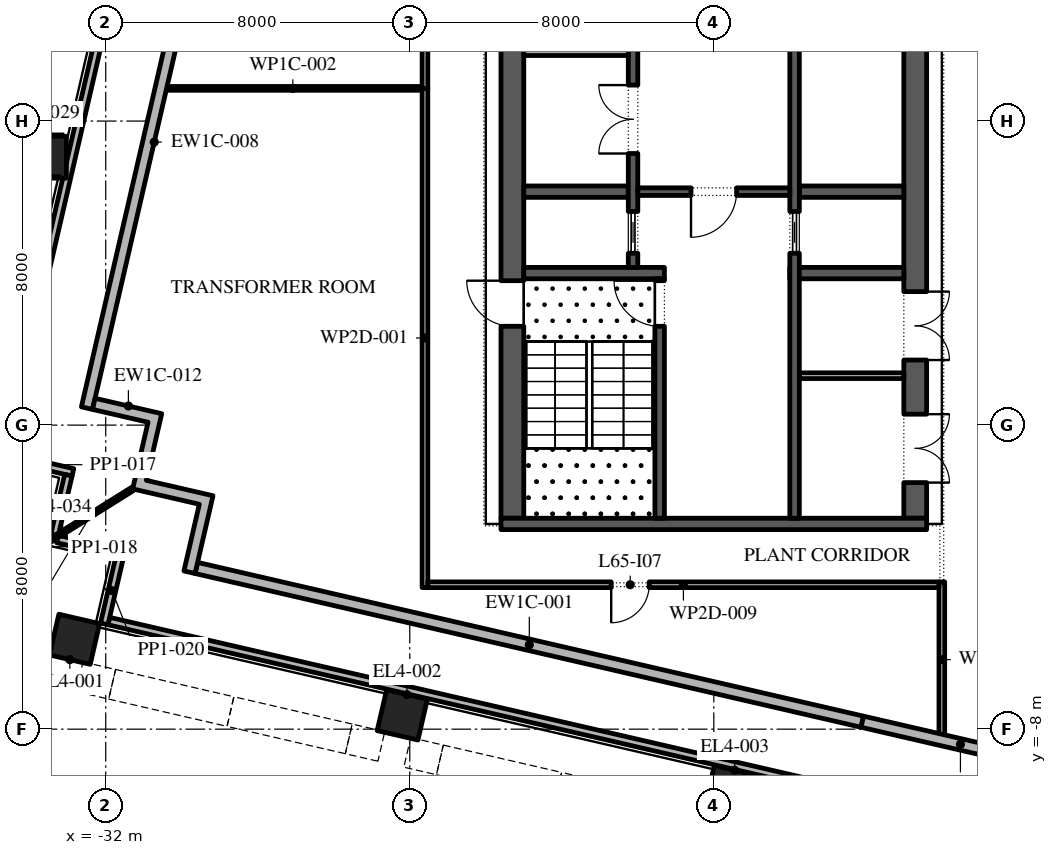
"""IFC4 building model, lengths in metres.
Left out: names, types, materials, properties, quantities, classifications, styles, units other than length and angle.
Written with IfcOpenShell. Run it as: python <this file> out.ifc"""

import sys

from ifc_helpers import new_model, si_unit, direction, frame, frame_2d, origin, origin_2d, place, context, subcontext, project, spatial, polyline, rectangle, outline, extrude, element, fill, save


model = new_model("IFC4")
c1 = context("Model", 3, precision=1e-05, world=origin(), true_north=direction((0.0, 1.0)))
c2 = subcontext(c1, "Body", "Model", "MODEL_VIEW")
j1 = project(units=[si_unit("LENGTHUNIT", "METRE"), si_unit("PLANEANGLEUNIT", "RADIAN")], contexts=[c1])
p1 = place(None, origin())
s1 = spatial("IfcSite", under=j1, at=p1, CompositionType="ELEMENT")
p2 = place(p1, origin())
s2 = spatial("IfcBuilding", under=s1, at=p2, CompositionType="ELEMENT")
p3 = place(p2, frame((0.0, 0.0, 297.6)))
s3 = spatial("IfcBuildingStorey", under=s2, at=p3, CompositionType="ELEMENT", Elevation=297.6)
for number, where, z_axis, x_axis in (
    (1, (-32.821, -5.635, 0.0), (0.0, 0.0, 1.0), (0.974, -0.225, 0.0)),
    (2, (-24.197, -7.626, 0.0), (0.0, 0.0, 1.0), (0.974, -0.225, 0.0)),
    (3, (-15.574, -9.617, 0.0), (0.0, 0.0, 1.0), (0.974, -0.225, 0.0)),
):
    element("IfcColumn", number, at=place(p3, frame(where, z_axis=z_axis, x_axis=x_axis)), inside=s3, PredefinedType="COLUMN", context=c2, shape_type="SweptSolid", body=[
        extrude(rectangle(XDim=1.1, YDim=1.1, at=origin_2d()), origin(), (0.0, 0.0, 1.0), 5.4),
    ])
p4 = place(p3, frame((-33.587, 7.049, 0.0), z_axis=(0.002938534749, 0.012658303533, 0.999915562618), x_axis=(-0.974097200243, 0.226129707199, 0.0)))
e4 = element("IfcColumn", 4, at=p4, inside=s3, PredefinedType="COLUMN", context=c2, shape_type="SweptSolid", body=[
    extrude(rectangle(XDim=1.1, YDim=1.1, at=origin_2d()), origin(), (0.0, 0.0, 1.0), 5.4),
])
p5 = place(p3, frame((-29.616, -3.758, 0.0), z_axis=(0.0, 0.0, 1.0), x_axis=(0.974371744197, -0.224943779886, 0.0)))
e5 = element("IfcWall", 5, at=p5, inside=s3, PredefinedType="STANDARD", context=c2, shape_type="SweptSolid", body=[
    extrude(rectangle(XDim=17.984, YDim=0.3, at=frame_2d((8.992, 0.0))), origin(), (0.0, 0.0, 1.0), 4.95),
])
p6 = place(p3, origin())
e6 = element("IfcWall", 6, at=p6, inside=s3, PredefinedType="STANDARD", context=c2, shape_type="SweptSolid", body=[
    extrude(outline(polyline([(-31.291, -1.678), (-30.886, 0.076), (-32.348, 0.413), (-32.28, 0.705), (-30.526, 0.301), (-30.931, -1.453), (-29.177, -1.858), (-29.65, -3.905), (-29.942, -3.837), (-29.537, -2.083), (-31.291, -1.678)])), origin(), (0.0, 0.0, 1.0), 4.95),
])
p7 = place(p3, frame((-31.919, -5.156, -0.05), z_axis=(0.0, 0.0, 1.0), x_axis=(0.974370681559, -0.224948382787, 0.0)))
e7 = element("IfcWall", 7, at=p7, inside=s3, PredefinedType="STANDARD", context=c2, shape_type="SweptSolid", body=[
    extrude(rectangle(XDim=51.76, YDim=0.2, at=frame_2d((25.88, 0.0))), origin(), (0.0, 0.0, 1.0), 1.1),
])
p8 = place(p3, frame((-21.517, 56.35, -0.05), z_axis=(0.0, 0.0, 1.0), x_axis=(-0.224951435492, -0.97436997679, 0.0)))
e8 = element("IfcWall", 8, at=p8, inside=s3, PredefinedType="STANDARD", context=c2, shape_type="SweptSolid", body=[
    extrude(rectangle(XDim=58.769, YDim=0.2, at=frame_2d((29.385, 0.0))), origin(), (0.0, 0.0, 1.0), 1.1),
])
p9 = place(p3, frame((-34.617, -0.838, -0.05), z_axis=(0.0, 0.0, 1.0), x_axis=(0.974356896201, -0.225008086135, 0.0)))
e9 = element("IfcWall", 9, at=p9, inside=s3, PredefinedType="STANDARD", context=c2, shape_type="SweptSolid", body=[
    extrude(rectangle(XDim=1.8, YDim=0.2, at=frame_2d((0.9, 0.0))), origin(), (0.0, 0.0, 1.0), 1.1),
])
p10 = place(p3, frame((-32.983, -1.318, -0.05), z_axis=(0.0, 0.0, 1.0), x_axis=(-0.22502584423, -0.974352795156, 0.0)))
e10 = element("IfcWall", 10, at=p10, inside=s3, PredefinedType="STANDARD", context=c2, shape_type="SweptSolid", body=[
    extrude(rectangle(XDim=1.608, YDim=0.2, at=frame_2d((0.804, 0.0))), origin(), (0.0, 0.0, 1.0), 1.1),
])
for number, where, z_axis, x_axis in (
    (11, (-33.269, -2.997, -0.05), (0.0, 0.0, 1.0), (0.974, -0.225, 0.0)),
    (12, (-31.635, -3.477, -0.05), (0.0, 0.0, 1.0), (-0.225, -0.974, 0.0)),
):
    element("IfcWall", number, at=place(p3, frame(where, z_axis=z_axis, x_axis=x_axis)), inside=s3, PredefinedType="STANDARD", context=c2, shape_type="SweptSolid", body=[
        extrude(rectangle(XDim=1.8, YDim=0.2, at=frame_2d((0.9, 0.0))), origin(), (0.0, 0.0, 1.0), 1.1),
    ])
p11 = place(p3, frame((-31.291, -1.678, -0.05), z_axis=(0.0, 0.0, 1.0), x_axis=(-0.84807753525, -0.529872148923, 0.0)))
e13 = element("IfcWall", 13, at=p11, inside=s3, PredefinedType="STANDARD", context=c2, shape_type="SweptSolid", body=[
    extrude(rectangle(XDim=2.596, YDim=0.1, at=frame_2d((1.298, 0.0))), origin(), (0.0, 0.0, 1.0), 5.0),
])
p12 = place(p3, frame((-21.3, -2.45, 0.0), z_axis=(0.0, 0.0, 1.0), x_axis=(0.0, 1.0, 0.0)))
e14 = element("IfcWall", 14, at=p12, inside=s3, PredefinedType="SHEAR", context=c2, shape_type="SweptSolid", body=[
    extrude(rectangle(XDim=27.9, YDim=0.6, at=frame_2d((13.95, 0.0))), origin(), (0.0, 0.0, 1.0), 4.95),
])
p13 = place(p12, frame((5.05, 0.0, 0.0)))
e15 = element("IfcOpeningElement", 15, at=p13, cuts=e14, PredefinedType="OPENING", context=c2, shape_type="SweptSolid", body=[
    extrude(rectangle(XDim=1.2, YDim=2.1, at=frame_2d((0.6, 1.05))), frame((0.0, 0.31, 0.0), z_axis=(0.0, -1.0, 0.0), x_axis=(1.0, 0.0, 0.0)), (0.0, 0.0, 1.0), 0.62),
])
p14 = place(p12, frame((21.65, 0.0, 0.0)))
e16 = element("IfcOpeningElement", 16, at=p14, cuts=e14, PredefinedType="OPENING", context=c2, shape_type="SweptSolid", body=[
    extrude(rectangle(XDim=1.2, YDim=2.1, at=frame_2d((0.6, 1.05))), frame((0.0, 0.31, 0.0), z_axis=(0.0, -1.0, 0.0), x_axis=(1.0, 0.0, 0.0)), (0.0, 0.0, 1.0), 0.62),
])
p15 = place(p3, frame((-10.7, -2.45, 0.0), z_axis=(0.0, 0.0, 1.0), x_axis=(0.0, 1.0, 0.0)))
e17 = element("IfcWall", 17, at=p15, inside=s3, PredefinedType="SHEAR", context=c2, shape_type="SweptSolid", body=[
    extrude(rectangle(XDim=27.9, YDim=0.6, at=frame_2d((13.95, 0.0))), origin(), (0.0, 0.0, 1.0), 4.95),
])
p16 = place(p15, frame((23.65, 0.0, 0.0)))
e18 = element("IfcOpeningElement", 18, at=p16, cuts=e17, PredefinedType="OPENING", context=c2, shape_type="SweptSolid", body=[
    extrude(rectangle(XDim=2.4, YDim=2.1, at=frame_2d((1.2, 1.05))), frame((0.0, 0.31, 0.0), z_axis=(0.0, -1.0, 0.0), x_axis=(1.0, 0.0, 0.0)), (0.0, 0.0, 1.0), 0.62),
])
p17 = place(p15, frame((0.938, 0.0, 0.0)))
e19 = element("IfcOpeningElement", 19, at=p17, cuts=e17, PredefinedType="OPENING", context=c2, shape_type="SweptSolid", body=[
    extrude(rectangle(XDim=1.8, YDim=2.4, at=frame_2d((0.9, 1.2))), frame((0.0, 0.31, 0.0), z_axis=(0.0, -1.0, 0.0), x_axis=(1.0, 0.0, 0.0)), (0.0, 0.0, 1.0), 0.62),
])
p18 = place(p15, frame((4.163, 0.0, 0.0)))
e20 = element("IfcOpeningElement", 20, at=p18, cuts=e17, PredefinedType="OPENING", context=c2, shape_type="SweptSolid", body=[
    extrude(rectangle(XDim=1.8, YDim=2.4, at=frame_2d((0.9, 1.2))), frame((0.0, 0.31, 0.0), z_axis=(0.0, -1.0, 0.0), x_axis=(1.0, 0.0, 0.0)), (0.0, 0.0, 1.0), 0.62),
])
p19 = place(p3, frame((-21.6, -2.6, 0.0), z_axis=(0.0, 0.0, 1.0), x_axis=(1.0, 0.0, 0.0)))
e21 = element("IfcWall", 21, at=p19, inside=s3, PredefinedType="SHEAR", context=c2, shape_type="SweptSolid", body=[
    extrude(rectangle(XDim=11.2, YDim=0.3, at=frame_2d((5.6, 0.0))), origin(), (0.0, 0.0, 1.0), 4.95),
])
p20 = place(p3, frame((-21.0, 4.0, 0.0), z_axis=(0.0, 0.0, 1.0), x_axis=(1.0, 0.0, 0.0)))
e22 = element("IfcWall", 22, at=p20, inside=s3, PredefinedType="SHEAR", context=c2, shape_type="SweptSolid", body=[
    extrude(rectangle(XDim=3.7, YDim=0.3, at=frame_2d((1.85, 0.0))), origin(), (0.0, 0.0, 1.0), 4.95),
])
p21 = place(p3, frame((-17.425, -2.45, 0.0), z_axis=(0.0, 0.0, 1.0), x_axis=(0.0, 1.0, 0.0)))
e23 = element("IfcWall", 23, at=p21, inside=s3, PredefinedType="SHEAR", context=c2, shape_type="SweptSolid", body=[
    extrude(rectangle(XDim=6.3, YDim=0.25, at=frame_2d((3.15, 0.0))), origin(), (0.0, 0.0, 1.0), 4.95),
])
p22 = place(p21, frame((5.05, 0.0, 0.0)))
e24 = element("IfcOpeningElement", 24, at=p22, cuts=e23, PredefinedType="OPENING", context=c2, shape_type="SweptSolid", body=[
    extrude(rectangle(XDim=1.2, YDim=2.1, at=frame_2d((0.6, 1.05))), frame((0.0, 0.135, 0.0), z_axis=(0.0, -1.0, 0.0), x_axis=(1.0, 0.0, 0.0)), (0.0, 0.0, 1.0), 0.27),
])
p23 = place(p3, frame((-21.0, 6.143, 0.0), z_axis=(0.0, 0.0, 1.0), x_axis=(1.0, 0.0, 0.0)))
e25 = element("IfcWall", 25, at=p23, inside=s3, PredefinedType="SHEAR", context=c2, shape_type="SweptSolid", body=[
    extrude(rectangle(XDim=2.75, YDim=0.3, at=frame_2d((1.375, 0.0))), origin(), (0.0, 0.0, 1.0), 4.95),
])
p24 = place(p3, frame((-18.125, 4.15, 0.0), z_axis=(0.0, 0.0, 1.0), x_axis=(0.0, 1.0, 0.0)))
e26 = element("IfcWall", 26, at=p24, inside=s3, PredefinedType="SHEAR", context=c2, shape_type="SweptSolid", body=[
    extrude(rectangle(XDim=14.7, YDim=0.25, at=frame_2d((7.35, 0.0))), origin(), (0.0, 0.0, 1.0), 4.95),
])
p25 = place(p24, frame((2.996, 0.0, 0.0)))
e27 = element("IfcOpeningElement", 27, at=p25, cuts=e26, PredefinedType="OPENING", context=c2, shape_type="SweptSolid", body=[
    extrude(rectangle(XDim=1.8, YDim=2.4, at=frame_2d((0.9, 1.2))), frame((0.0, 0.135, 0.0), z_axis=(0.0, -1.0, 0.0), x_axis=(1.0, 0.0, 0.0)), (0.0, 0.0, 1.0), 0.27),
])
p26 = place(p24, frame((6.45, 0.0, 0.0)))
e28 = element("IfcOpeningElement", 28, at=p26, cuts=e26, PredefinedType="OPENING", context=c2, shape_type="SweptSolid", body=[
    extrude(rectangle(XDim=1.8, YDim=2.4, at=frame_2d((0.9, 1.2))), frame((0.0, 0.135, 0.0), z_axis=(0.0, -1.0, 0.0), x_axis=(1.0, 0.0, 0.0)), (0.0, 0.0, 1.0), 0.27),
])
p27 = place(p24, frame((9.904, 0.0, 0.0)))
e29 = element("IfcOpeningElement", 29, at=p27, cuts=e26, PredefinedType="OPENING", context=c2, shape_type="SweptSolid", body=[
    extrude(rectangle(XDim=1.8, YDim=2.4, at=frame_2d((0.9, 1.2))), frame((0.0, 0.135, 0.0), z_axis=(0.0, -1.0, 0.0), x_axis=(1.0, 0.0, 0.0)), (0.0, 0.0, 1.0), 0.27),
])
p28 = place(p24, frame((0.371, 0.0, 0.0)))
e30 = element("IfcOpeningElement", 30, at=p28, cuts=e26, PredefinedType="OPENING", context=c2, shape_type="SweptSolid", body=[
    extrude(rectangle(XDim=1.1, YDim=2.1, at=frame_2d((0.55, 1.05))), frame((0.0, 0.135, 0.0), z_axis=(0.0, -1.0, 0.0), x_axis=(1.0, 0.0, 0.0)), (0.0, 0.0, 1.0), 0.27),
])
p29 = place(p24, frame((13.229, 0.0, 0.0)))
e31 = element("IfcOpeningElement", 31, at=p29, cuts=e26, PredefinedType="OPENING", context=c2, shape_type="SweptSolid", body=[
    extrude(rectangle(XDim=1.1, YDim=2.1, at=frame_2d((0.55, 1.05))), frame((0.0, 0.135, 0.0), z_axis=(0.0, -1.0, 0.0), x_axis=(1.0, 0.0, 0.0)), (0.0, 0.0, 1.0), 0.27),
])
p30 = place(p3, frame((-21.0, 9.8, 0.0), z_axis=(0.0, 0.0, 1.0), x_axis=(1.0, 0.0, 0.0)))
e32 = element("IfcWall", 32, at=p30, inside=s3, PredefinedType="PARTITIONING", context=c2, shape_type="SweptSolid", body=[
    extrude(rectangle(XDim=2.75, YDim=0.15, at=frame_2d((1.375, 0.0))), origin(), (0.0, 0.0, 1.0), 4.95),
])
p31 = place(p3, frame((-14.0, 4.0, 0.0), z_axis=(0.0, 0.0, 1.0), x_axis=(1.0, 0.0, 0.0)))
e33 = element("IfcWall", 33, at=p31, inside=s3, PredefinedType="SHEAR", context=c2, shape_type="SweptSolid", body=[
    extrude(rectangle(XDim=3.0, YDim=0.3, at=frame_2d((1.5, 0.0))), origin(), (0.0, 0.0, 1.0), 4.95),
])
p32 = place(p3, frame((-13.75, 6.143, 0.0), z_axis=(0.0, 0.0, 1.0), x_axis=(1.0, 0.0, 0.0)))
e34 = element("IfcWall", 34, at=p32, inside=s3, PredefinedType="SHEAR", context=c2, shape_type="SweptSolid", body=[
    extrude(rectangle(XDim=2.75, YDim=0.3, at=frame_2d((1.375, 0.0))), origin(), (0.0, 0.0, 1.0), 4.95),
])
p33 = place(p3, frame((-13.875, -2.45, 0.0), z_axis=(0.0, 0.0, 1.0), x_axis=(0.0, 1.0, 0.0)))
e35 = element("IfcWall", 35, at=p33, inside=s3, PredefinedType="SHEAR", context=c2, shape_type="SweptSolid", body=[
    extrude(rectangle(XDim=21.3, YDim=0.25, at=frame_2d((10.65, 0.0))), origin(), (0.0, 0.0, 1.0), 4.95),
])
p34 = place(p33, frame((17.336, 0.0, 0.0)))
e36 = element("IfcOpeningElement", 36, at=p34, cuts=e35, PredefinedType="OPENING", context=c2, shape_type="SweptSolid", body=[
    extrude(rectangle(XDim=1.8, YDim=2.4, at=frame_2d((0.9, 1.2))), frame((0.0, 0.135, 0.0), z_axis=(0.0, -1.0, 0.0), x_axis=(1.0, 0.0, 0.0)), (0.0, 0.0, 1.0), 0.27),
])
p35 = place(p33, frame((6.971, 0.0, 0.0)))
e37 = element("IfcOpeningElement", 37, at=p35, cuts=e35, PredefinedType="OPENING", context=c2, shape_type="SweptSolid", body=[
    extrude(rectangle(XDim=1.1, YDim=2.1, at=frame_2d((0.55, 1.05))), frame((0.0, 0.135, 0.0), z_axis=(0.0, -1.0, 0.0), x_axis=(1.0, 0.0, 0.0)), (0.0, 0.0, 1.0), 0.27),
])
p36 = place(p3, frame((-18.0, 6.143, 0.0), z_axis=(0.0, 0.0, 1.0), x_axis=(1.0, 0.0, 0.0)))
e38 = element("IfcWall", 38, at=p36, inside=s3, PredefinedType="SHEAR", context=c2, shape_type="SweptSolid", body=[
    extrude(rectangle(XDim=4.0, YDim=0.2, at=frame_2d((2.0, 0.0))), origin(), (0.0, 0.0, 1.0), 4.95),
])
p37 = place(p36, frame((1.4, 0.0, 0.0)))
e39 = element("IfcOpeningElement", 39, at=p37, cuts=e38, PredefinedType="OPENING", context=c2, shape_type="SweptSolid", body=[
    extrude(rectangle(XDim=1.2, YDim=2.1, at=frame_2d((0.6, 1.05))), frame((0.0, 0.11, 0.0), z_axis=(0.0, -1.0, 0.0), x_axis=(1.0, 0.0, 0.0)), (0.0, 0.0, 1.0), 0.22),
])
p38 = place(p3, frame((-13.75, 1.3, 0.0), z_axis=(0.0, 0.0, 1.0), x_axis=(1.0, 0.0, 0.0)))
e40 = element("IfcWall", 40, at=p38, inside=s3, PredefinedType="PARTITIONING", context=c2, shape_type="SweptSolid", body=[
    extrude(rectangle(XDim=2.75, YDim=0.15, at=frame_2d((1.375, 0.0))), origin(), (0.0, 0.0, 1.0), 4.95),
])
p39 = place(p3, frame((-23.6, -4.275, 0.0), z_axis=(0.0, 0.0, 1.0), x_axis=(0.0, 1.0, 0.0)))
e41 = element("IfcWall", 41, at=p39, inside=s3, PredefinedType="PARTITIONING", context=c2, shape_type="SweptSolid", body=[
    extrude(rectangle(XDim=13.135, YDim=0.15, at=frame_2d((6.567, 0.0))), origin(), (0.0, 0.0, 1.0), 4.95),
])
p40 = place(p3, frame((-23.675, 8.86, 0.0), z_axis=(0.0, 0.0, 1.0), x_axis=(-1.0, 0.0, 0.0)))
e42 = element("IfcWall", 42, at=p40, inside=s3, PredefinedType="PARTITIONING", context=c2, shape_type="SweptSolid", body=[
    extrude(rectangle(XDim=6.805, YDim=0.1, at=frame_2d((3.402, 0.0))), origin(), (0.0, 0.0, 1.0), 4.95),
])
p41 = place(p3, frame((-23.6, 8.86, 0.0), z_axis=(0.0, 0.0, 1.0), x_axis=(0.0, 1.0, 0.0)))
e43 = element("IfcWall", 43, at=p41, inside=s3, PredefinedType="PARTITIONING", context=c2, shape_type="SweptSolid", body=[
    extrude(rectangle(XDim=13.91, YDim=0.15, at=frame_2d((6.955, 0.0))), origin(), (0.0, 0.0, 1.0), 4.95),
])
p42 = place(p41, frame((9.21, 0.0, 0.0)))
e44 = element("IfcOpeningElement", 44, at=p42, cuts=e43, PredefinedType="OPENING", context=c2, shape_type="SweptSolid", body=[
    extrude(rectangle(XDim=1.0, YDim=2.1, at=frame_2d((0.5, 1.05))), frame((0.0, 0.085, 0.0), z_axis=(0.0, -1.0, 0.0), x_axis=(1.0, 0.0, 0.0)), (0.0, 0.0, 1.0), 0.17),
])
p43 = place(p3, frame((-10.0, -8.216, 0.0), z_axis=(0.0, 0.0, 1.0), x_axis=(0.0, 1.0, 0.0)))
e45 = element("IfcWall", 45, at=p43, inside=s3, PredefinedType="PARTITIONING", context=c2, shape_type="SweptSolid", body=[
    extrude(rectangle(XDim=4.091, YDim=0.15, at=frame_2d((2.045, 0.0))), origin(), (0.0, 0.0, 1.0), 4.95),
])
p44 = place(p3, frame((-10.075, -4.2, 0.0), z_axis=(0.0, 0.0, 1.0), x_axis=(-1.0, 0.0, 0.0)))
e46 = element("IfcWall", 46, at=p44, inside=s3, PredefinedType="PARTITIONING", context=c2, shape_type="SweptSolid", body=[
    extrude(rectangle(XDim=13.45, YDim=0.15, at=frame_2d((6.725, 0.0))), origin(), (0.0, 0.0, 1.0), 4.95),
])
p45 = place(p44, frame((7.625, 0.0, 0.0)))
e47 = element("IfcOpeningElement", 47, at=p45, cuts=e46, PredefinedType="OPENING", context=c2, shape_type="SweptSolid", body=[
    extrude(rectangle(XDim=1.0, YDim=2.1, at=frame_2d((0.5, 1.05))), frame((0.0, 0.085, 0.0), z_axis=(0.0, -1.0, 0.0), x_axis=(1.0, 0.0, 0.0)), (0.0, 0.0, 1.0), 0.17),
])
p46 = place(p3, frame((-12.093, -7.804, 0.0), z_axis=(0.0, 0.0, 1.0), x_axis=(0.974367901354, -0.224960424989, 0.0)))
e48 = element("IfcWall", 48, at=p46, inside=s3, PredefinedType="STANDARD", context=c2, shape_type="SweptSolid", body=[
    extrude(rectangle(XDim=5.3, YDim=0.3, at=frame_2d((2.65, 0.0))), origin(), (0.0, 0.0, 1.0), 4.05),
])
p47 = place(p3, frame((-29.246, 14.514, 0.0), z_axis=(0.0, 0.0, 1.0), x_axis=(-0.224953365503, -0.974369531209, 0.0)))
e49 = element("IfcWall", 49, at=p47, inside=s3, PredefinedType="STANDARD", context=c2, shape_type="SweptSolid", body=[
    extrude(rectangle(XDim=14.438, YDim=0.3, at=frame_2d((7.219, 0.0))), origin(), (0.0, 0.0, 1.0), 4.95),
])
p48 = place(p25, origin())
e50 = element("IfcDoor", 50, at=p48, inside=s3, OperationType="DOUBLE_DOOR_SINGLE_SWING", PredefinedType="DOOR", context=c2, shape_type="SweptSolid", body=[
    extrude(rectangle(XDim=1.8, YDim=2.4, at=frame_2d((0.9, 1.2))), frame((0.0, 0.125, 0.0), z_axis=(0.0, -1.0, 0.0), x_axis=(1.0, 0.0, 0.0)), (0.0, 0.0, 1.0), 0.05),
])
fill(e27, e50)
p49 = place(p28, origin())
e51 = element("IfcDoor", 51, at=p49, inside=s3, OperationType="SLIDING_TO_LEFT", PredefinedType="DOOR", context=c2, shape_type="SweptSolid", body=[
    extrude(rectangle(XDim=1.1, YDim=2.1, at=frame_2d((0.55, 1.05))), frame((0.0, 0.025, 0.0), z_axis=(0.0, -1.0, 0.0), x_axis=(1.0, 0.0, 0.0)), (0.0, 0.0, 1.0), 0.05),
])
fill(e30, e51)
p50 = place(p35, origin())
e52 = element("IfcDoor", 52, at=p50, inside=s3, OperationType="SLIDING_TO_LEFT", PredefinedType="DOOR", context=c2, shape_type="SweptSolid", body=[
    extrude(rectangle(XDim=1.1, YDim=2.1, at=frame_2d((0.55, 1.05))), frame((0.0, 0.025, 0.0), z_axis=(0.0, -1.0, 0.0), x_axis=(1.0, 0.0, 0.0)), (0.0, 0.0, 1.0), 0.05),
])
fill(e37, e52)
p51 = place(p37, frame((1.2, 0.0, 0.0), z_axis=(0.0, 0.0, 1.0), x_axis=(-1.0, 0.0, 0.0)))
e53 = element("IfcDoor", 53, at=p51, inside=s3, OperationType="SINGLE_SWING_LEFT", PredefinedType="DOOR", context=c2, shape_type="SweptSolid", body=[
    extrude(rectangle(XDim=1.2, YDim=2.1, at=frame_2d((0.6, 1.05))), frame((0.0, 0.025, 0.0), z_axis=(0.0, -1.0, 0.0), x_axis=(1.0, 0.0, 0.0)), (0.0, 0.0, 1.0), 0.05),
])
fill(e39, e53)
p52 = place(p22, origin())
e54 = element("IfcDoor", 54, at=p52, inside=s3, OperationType="SINGLE_SWING_LEFT", PredefinedType="DOOR", context=c2, shape_type="SweptSolid", body=[
    extrude(rectangle(XDim=1.2, YDim=2.1, at=frame_2d((0.6, 1.05))), frame((0.0, 0.025, 0.0), z_axis=(0.0, -1.0, 0.0), x_axis=(1.0, 0.0, 0.0)), (0.0, 0.0, 1.0), 0.05),
])
fill(e24, e54)
p53 = place(p13, origin())
e55 = element("IfcDoor", 55, at=p53, inside=s3, OperationType="SINGLE_SWING_LEFT", PredefinedType="DOOR", context=c2, shape_type="SweptSolid", body=[
    extrude(rectangle(XDim=1.2, YDim=2.1, at=frame_2d((0.6, 1.05))), frame((0.0, 0.025, 0.0), z_axis=(0.0, -1.0, 0.0), x_axis=(1.0, 0.0, 0.0)), (0.0, 0.0, 1.0), 0.05),
])
fill(e15, e55)
p54 = place(p17, frame((1.8, 0.55, 0.0), z_axis=(0.0, 0.0, 1.0), x_axis=(-1.0, 0.0, 0.0)))
e56 = element("IfcDoor", 56, at=p54, inside=s3, OperationType="DOUBLE_DOOR_SINGLE_SWING", PredefinedType="DOOR", context=c2, shape_type="SweptSolid", body=[
    extrude(rectangle(XDim=1.8, YDim=2.4, at=frame_2d((0.9, 1.2))), frame((0.0, 0.3, 0.0), z_axis=(0.0, -1.0, 0.0), x_axis=(1.0, 0.0, 0.0)), (0.0, 0.0, 1.0), 0.05),
])
fill(e19, e56)
p55 = place(p18, frame((1.8, 0.55, 0.0), z_axis=(0.0, 0.0, 1.0), x_axis=(-1.0, 0.0, 0.0)))
e57 = element("IfcDoor", 57, at=p55, inside=s3, OperationType="DOUBLE_DOOR_SINGLE_SWING", PredefinedType="DOOR", context=c2, shape_type="SweptSolid", body=[
    extrude(rectangle(XDim=1.8, YDim=2.4, at=frame_2d((0.9, 1.2))), frame((0.0, 0.3, 0.0), z_axis=(0.0, -1.0, 0.0), x_axis=(1.0, 0.0, 0.0)), (0.0, 0.0, 1.0), 0.05),
])
fill(e20, e57)
p56 = place(p45, origin())
e58 = element("IfcDoor", 58, at=p56, inside=s3, OperationType="SINGLE_SWING_LEFT", PredefinedType="DOOR", context=c2, shape_type="SweptSolid", body=[
    extrude(rectangle(XDim=1.0, YDim=2.1, at=frame_2d((0.5, 1.05))), frame((0.0, 0.025, 0.0), z_axis=(0.0, -1.0, 0.0), x_axis=(1.0, 0.0, 0.0)), (0.0, 0.0, 1.0), 0.05),
])
fill(e47, e58)
save(model, sys.argv[1])
